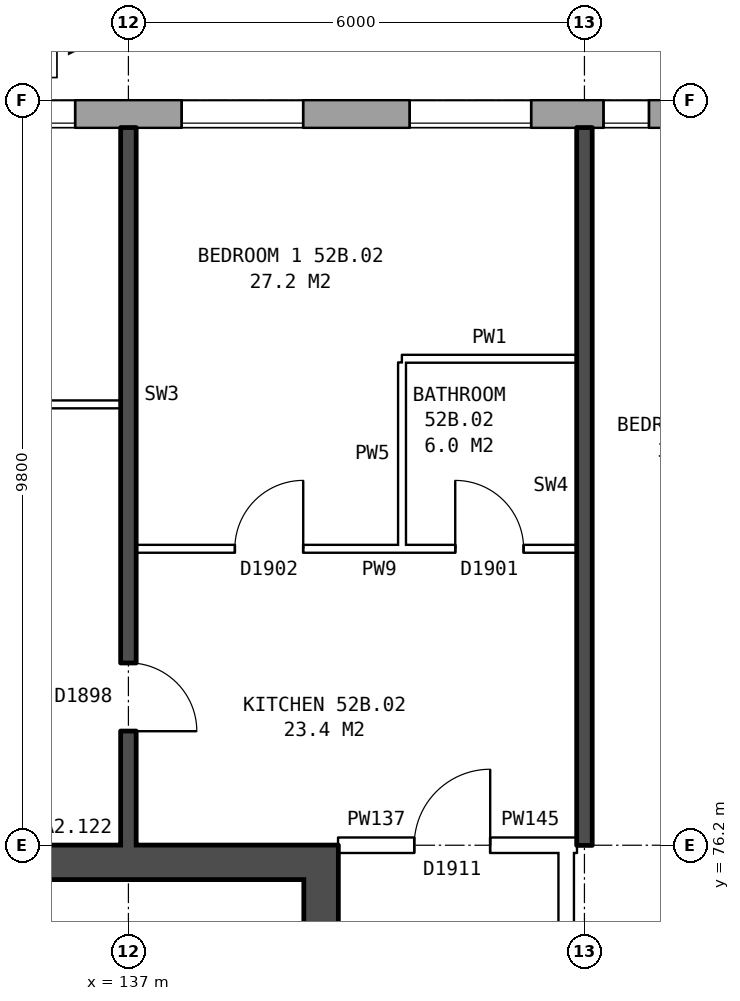
"""IFC4 building model, lengths in metres.
Left out: names, types, materials, properties, quantities, classifications, styles, units other than length and angle.
Written with IfcOpenShell. Run it as: python <this file> out.ifc"""

import sys

from ifc_helpers import new_model, si_unit, direction, frame, frame_2d, origin, place, context, subcontext, project, spatial, rectangle, extrude, element, fill, save


model = new_model("IFC4")
c1 = context("Model", 3, precision=1e-05, world=origin(), true_north=direction((0.0, 1.0)))
c2 = subcontext(c1, "Body", "Model", "MODEL_VIEW")
j1 = project(units=[si_unit("LENGTHUNIT", "METRE"), si_unit("PLANEANGLEUNIT", "RADIAN")], contexts=[c1])
p1 = place(None, origin())
s1 = spatial("IfcSite", under=j1, at=p1, CompositionType="ELEMENT")
p2 = place(p1, origin())
s2 = spatial("IfcBuilding", under=s1, at=p2, CompositionType="ELEMENT")
p3 = place(p2, frame((0.0, 0.0, 185.1)))
s3 = spatial("IfcBuildingStorey", under=s2, at=p3, CompositionType="ELEMENT", Elevation=185.1)
p4 = place(p3, frame((167.175, 85.82, 0.0), z_axis=(0.0, 0.0, 1.0), x_axis=(-1.0, 0.0, 0.0)))
e1 = element("IfcWall", 1, at=p4, inside=s3, PredefinedType="STANDARD", context=c2, shape_type="SweptSolid", body=[
    extrude(rectangle(XDim=33.101, YDim=0.36, at=frame_2d((16.55, 0.0))), origin(), (0.0, 0.0, 1.0), 2.85),
])
p5 = place(p4, frame((0.875, 0.0, 0.8)))
e2 = element("IfcOpeningElement", 2, at=p5, cuts=e1, PredefinedType="OPENING", context=c2, shape_type="SweptSolid", body=[
    extrude(rectangle(XDim=1.6, YDim=1.8, at=frame_2d((0.8, 0.9))), frame((0.0, 0.19, 0.0), z_axis=(0.0, -1.0, 0.0), x_axis=(1.0, 0.0, 0.0)), (0.0, 0.0, 1.0), 0.38),
])
p6 = place(p4, frame((3.875, 0.0, 0.8)))
e3 = element("IfcOpeningElement", 3, at=p6, cuts=e1, PredefinedType="OPENING", context=c2, shape_type="SweptSolid", body=[
    extrude(rectangle(XDim=1.6, YDim=1.8, at=frame_2d((0.8, 0.9))), frame((0.0, 0.19, 0.0), z_axis=(0.0, -1.0, 0.0), x_axis=(1.0, 0.0, 0.0)), (0.0, 0.0, 1.0), 0.38),
])
p7 = place(p4, frame((6.875, 0.0, 0.8)))
e4 = element("IfcOpeningElement", 4, at=p7, cuts=e1, PredefinedType="OPENING", context=c2, shape_type="SweptSolid", body=[
    extrude(rectangle(XDim=1.6, YDim=1.8, at=frame_2d((0.8, 0.9))), frame((0.0, 0.19, 0.0), z_axis=(0.0, -1.0, 0.0), x_axis=(1.0, 0.0, 0.0)), (0.0, 0.0, 1.0), 0.38),
])
p8 = place(p4, frame((8.775, 0.0, 1.4)))
e5 = element("IfcOpeningElement", 5, at=p8, cuts=e1, PredefinedType="OPENING", context=c2, shape_type="SweptSolid", body=[
    extrude(rectangle(XDim=0.8, YDim=1.2, at=frame_2d((0.4, 0.6))), frame((0.0, 0.19, 0.0), z_axis=(0.0, -1.0, 0.0), x_axis=(1.0, 0.0, 0.0)), (0.0, 0.0, 1.0), 0.38),
])
p9 = place(p4, frame((12.875, 0.0, 0.8)))
e6 = element("IfcOpeningElement", 6, at=p9, cuts=e1, PredefinedType="OPENING", context=c2, shape_type="SweptSolid", body=[
    extrude(rectangle(XDim=1.6, YDim=1.8, at=frame_2d((0.8, 0.9))), frame((0.0, 0.19, 0.0), z_axis=(0.0, -1.0, 0.0), x_axis=(1.0, 0.0, 0.0)), (0.0, 0.0, 1.0), 0.38),
])
p10 = place(p4, frame((15.875, 0.0, 0.8)))
e7 = element("IfcOpeningElement", 7, at=p10, cuts=e1, PredefinedType="OPENING", context=c2, shape_type="SweptSolid", body=[
    extrude(rectangle(XDim=1.6, YDim=1.8, at=frame_2d((0.8, 0.9))), frame((0.0, 0.19, 0.0), z_axis=(0.0, -1.0, 0.0), x_axis=(1.0, 0.0, 0.0)), (0.0, 0.0, 1.0), 0.38),
])
p11 = place(p4, frame((18.875, 0.0, 0.8)))
e8 = element("IfcOpeningElement", 8, at=p11, cuts=e1, PredefinedType="OPENING", context=c2, shape_type="SweptSolid", body=[
    extrude(rectangle(XDim=1.6, YDim=1.8, at=frame_2d((0.8, 0.9))), frame((0.0, 0.19, 0.0), z_axis=(0.0, -1.0, 0.0), x_axis=(1.0, 0.0, 0.0)), (0.0, 0.0, 1.0), 0.38),
])
p12 = place(p4, frame((21.325, 0.0, 0.25)))
e9 = element("IfcOpeningElement", 9, at=p12, cuts=e1, PredefinedType="OPENING", context=c2, shape_type="SweptSolid", body=[
    extrude(rectangle(XDim=0.6, YDim=1.8, at=frame_2d((0.3, 0.9))), frame((0.0, 0.19, 0.0), z_axis=(0.0, -1.0, 0.0), x_axis=(1.0, 0.0, 0.0)), (0.0, 0.0, 1.0), 0.38),
])
p13 = place(p4, frame((24.875, 0.0, 0.8)))
e10 = element("IfcOpeningElement", 10, at=p13, cuts=e1, PredefinedType="OPENING", context=c2, shape_type="SweptSolid", body=[
    extrude(rectangle(XDim=1.6, YDim=1.8, at=frame_2d((0.8, 0.9))), frame((0.0, 0.19, 0.0), z_axis=(0.0, -1.0, 0.0), x_axis=(1.0, 0.0, 0.0)), (0.0, 0.0, 1.0), 0.38),
])
p14 = place(p4, frame((27.875, 0.0, 0.8)))
e11 = element("IfcOpeningElement", 11, at=p14, cuts=e1, PredefinedType="OPENING", context=c2, shape_type="SweptSolid", body=[
    extrude(rectangle(XDim=1.6, YDim=1.8, at=frame_2d((0.8, 0.9))), frame((0.0, 0.19, 0.0), z_axis=(0.0, -1.0, 0.0), x_axis=(1.0, 0.0, 0.0)), (0.0, 0.0, 1.0), 0.38),
])
p15 = place(p4, frame((30.875, 0.0, 0.8)))
e12 = element("IfcOpeningElement", 12, at=p15, cuts=e1, PredefinedType="OPENING", context=c2, shape_type="SweptSolid", body=[
    extrude(rectangle(XDim=1.6, YDim=1.8, at=frame_2d((0.8, 0.9))), frame((0.0, 0.19, 0.0), z_axis=(0.0, -1.0, 0.0), x_axis=(1.0, 0.0, 0.0)), (0.0, 0.0, 1.0), 0.38),
])
p16 = place(p4, frame((11.125, 0.0, 0.8)))
e13 = element("IfcOpeningElement", 13, at=p16, cuts=e1, PredefinedType="OPENING", context=c2, shape_type="SweptSolid", body=[
    extrude(rectangle(XDim=0.8, YDim=1.2, at=frame_2d((0.4, 0.6))), frame((0.0, 0.19, 0.0), z_axis=(0.0, -1.0, 0.0), x_axis=(1.0, 0.0, 0.0)), (0.0, 0.0, 1.0), 0.38),
])
p17 = place(p4, frame((22.225, 0.0, 0.15)))
e14 = element("IfcOpeningElement", 14, at=p17, cuts=e1, PredefinedType="OPENING", context=c2, shape_type="SweptSolid", body=[
    extrude(rectangle(XDim=0.6, YDim=0.9, at=frame_2d((0.3, 0.45))), frame((0.0, 0.19, 0.0), z_axis=(0.0, -1.0, 0.0), x_axis=(1.0, 0.0, 0.0)), (0.0, 0.0, 1.0), 0.38),
])
p18 = place(p4, frame((23.325, 0.0, 1.65)))
e15 = element("IfcOpeningElement", 15, at=p18, cuts=e1, PredefinedType="OPENING", context=c2, shape_type="SweptSolid", body=[
    extrude(rectangle(XDim=0.6, YDim=0.9, at=frame_2d((0.3, 0.45))), frame((0.0, 0.19, 0.0), z_axis=(0.0, -1.0, 0.0), x_axis=(1.0, 0.0, 0.0)), (0.0, 0.0, 1.0), 0.38),
])
p19 = place(p3, frame((139.535, 63.8, 0.0), z_axis=(0.0, 0.0, 1.0), x_axis=(0.0, 1.0, 0.0)))
e16 = element("IfcWall", 16, at=p19, inside=s3, PredefinedType="SHEAR", context=c2, shape_type="SweptSolid", body=[
    extrude(rectangle(XDim=12.4, YDim=0.45, at=frame_2d((6.2, 0.0))), origin(), (0.0, 0.0, 1.0), 2.85),
])
p20 = place(p19, frame((1.325, 0.0, 0.0)))
e17 = element("IfcOpeningElement", 17, at=p20, cuts=e16, PredefinedType="OPENING", context=c2, shape_type="SweptSolid", body=[
    extrude(rectangle(XDim=1.1, YDim=2.1, at=frame_2d((0.55, 1.05))), frame((0.0, 0.235, 0.0), z_axis=(0.0, -1.0, 0.0), x_axis=(1.0, 0.0, 0.0)), (0.0, 0.0, 1.0), 0.47),
])
p21 = place(p19, frame((3.6, 0.0, 0.0)))
e18 = element("IfcOpeningElement", 18, at=p21, cuts=e16, PredefinedType="OPENING", context=c2, shape_type="SweptSolid", body=[
    extrude(rectangle(XDim=1.1, YDim=2.1, at=frame_2d((0.55, 1.05))), frame((0.0, 0.235, 0.0), z_axis=(0.0, -1.0, 0.0), x_axis=(1.0, 0.0, 0.0)), (0.0, 0.0, 1.0), 0.47),
])
p22 = place(p19, frame((5.8, 0.0, 0.0)))
e19 = element("IfcOpeningElement", 19, at=p22, cuts=e16, PredefinedType="OPENING", context=c2, shape_type="SweptSolid", body=[
    extrude(rectangle(XDim=1.1, YDim=2.1, at=frame_2d((0.55, 1.05))), frame((0.0, 0.235, 0.0), z_axis=(0.0, -1.0, 0.0), x_axis=(1.0, 0.0, 0.0)), (0.0, 0.0, 1.0), 0.47),
])
p23 = place(p19, frame((9.9, 0.0, 0.0)))
e20 = element("IfcOpeningElement", 20, at=p23, cuts=e16, PredefinedType="OPENING", context=c2, shape_type="SweptSolid", body=[
    extrude(rectangle(XDim=1.1, YDim=2.1, at=frame_2d((0.55, 1.05))), frame((0.0, 0.235, 0.0), z_axis=(0.0, -1.0, 0.0), x_axis=(1.0, 0.0, 0.0)), (0.0, 0.0, 1.0), 0.47),
])
p24 = place(p19, frame((8.125, 0.0, 0.0)))
e21 = element("IfcOpeningElement", 21, at=p24, cuts=e16, PredefinedType="OPENING", context=c2, shape_type="SweptSolid", body=[
    extrude(rectangle(XDim=0.85, YDim=2.1, at=frame_2d((0.425, 1.05))), frame((0.0, 0.235, 0.0), z_axis=(0.0, -1.0, 0.0), x_axis=(1.0, 0.0, 0.0)), (0.0, 0.0, 1.0), 0.47),
])
p25 = place(p3, frame((139.31, 75.975, 0.0), z_axis=(0.0, 0.0, 1.0), x_axis=(-1.0, 0.0, 0.0)))
e22 = element("IfcWall", 22, at=p25, inside=s3, PredefinedType="SHEAR", context=c2, shape_type="SweptSolid", body=[
    extrude(rectangle(XDim=7.5, YDim=0.45, at=frame_2d((3.75, 0.0))), origin(), (0.0, 0.0, 1.0), 2.85),
])
p26 = place(p3, frame((142.76, 63.9, 0.0), z_axis=(0.0, 0.0, 1.0), x_axis=(0.0, 1.0, 0.0)))
e23 = element("IfcWall", 23, at=p26, inside=s3, PredefinedType="PARTITIONING", context=c2, shape_type="SweptSolid", body=[
    extrude(rectangle(XDim=12.2, YDim=0.2, at=frame_2d((6.1, 0.0))), origin(), (0.0, 0.0, 1.0), 2.85),
])
p27 = place(p26, frame((5.1, 0.0, 0.0)))
e24 = element("IfcOpeningElement", 24, at=p27, cuts=e23, PredefinedType="OPENING", context=c2, shape_type="SweptSolid", body=[
    extrude(rectangle(XDim=2.0, YDim=2.1, at=frame_2d((1.0, 1.05))), frame((0.0, 0.11, 0.0), z_axis=(0.0, -1.0, 0.0), x_axis=(1.0, 0.0, 0.0)), (0.0, 0.0, 1.0), 0.22),
])
p28 = place(p3, frame((139.76, 76.2, 0.0), z_axis=(0.0, 0.0, 1.0), x_axis=(1.0, 0.0, 0.0)))
e25 = element("IfcWall", 25, at=p28, inside=s3, PredefinedType="PARTITIONING", context=c2, shape_type="SweptSolid", body=[
    extrude(rectangle(XDim=3.0, YDim=0.2, at=frame_2d((1.5, 0.0))), origin(), (0.0, 0.0, 1.0), 2.85),
])
p29 = place(p28, frame((1.0, 0.0, 0.0)))
e26 = element("IfcOpeningElement", 26, at=p29, cuts=e25, PredefinedType="OPENING", context=c2, shape_type="SweptSolid", body=[
    extrude(rectangle(XDim=1.0, YDim=2.1, at=frame_2d((0.5, 1.05))), frame((0.0, 0.11, 0.0), z_axis=(0.0, -1.0, 0.0), x_axis=(1.0, 0.0, 0.0)), (0.0, 0.0, 1.0), 0.22),
])
p30 = place(p3, frame((142.76, 76.2, 0.0), z_axis=(0.0, 0.0, 1.0), x_axis=(1.0, 0.0, 0.0)))
e27 = element("IfcWall", 27, at=p30, inside=s3, PredefinedType="PARTITIONING", context=c2, shape_type="SweptSolid", body=[
    extrude(rectangle(XDim=0.14, YDim=0.2, at=frame_2d((0.07, 0.0))), origin(), (0.0, 0.0, 1.0), 2.85),
])
p31 = place(p3, frame((137.1, 80.1, 0.0), z_axis=(0.0, 0.0, 1.0), x_axis=(1.0, 0.0, 0.0)))
e28 = element("IfcWall", 28, at=p31, inside=s3, PredefinedType="PARTITIONING", context=c2, shape_type="SweptSolid", body=[
    extrude(rectangle(XDim=5.8, YDim=0.1, at=frame_2d((2.9, 0.0))), origin(), (0.0, 0.0, 1.0), 2.85),
])
p32 = place(p31, frame((1.3, 0.0, 0.0)))
e29 = element("IfcOpeningElement", 29, at=p32, cuts=e28, PredefinedType="OPENING", context=c2, shape_type="SweptSolid", body=[
    extrude(rectangle(XDim=0.9, YDim=2.1, at=frame_2d((0.45, 1.05))), frame((0.0, 0.06, 0.0), z_axis=(0.0, -1.0, 0.0), x_axis=(1.0, 0.0, 0.0)), (0.0, 0.0, 1.0), 0.12),
])
p33 = place(p31, frame((4.2, 0.0, 0.0)))
e30 = element("IfcOpeningElement", 30, at=p33, cuts=e28, PredefinedType="OPENING", context=c2, shape_type="SweptSolid", body=[
    extrude(rectangle(XDim=0.9, YDim=2.1, at=frame_2d((0.45, 1.05))), frame((0.0, 0.06, 0.0), z_axis=(0.0, -1.0, 0.0), x_axis=(1.0, 0.0, 0.0)), (0.0, 0.0, 1.0), 0.12),
])
p34 = place(p3, frame((131.36, 82.0, 0.0), z_axis=(0.0, 0.0, 1.0), x_axis=(1.0, 0.0, 0.0)))
e31 = element("IfcWall", 31, at=p34, inside=s3, PredefinedType="PARTITIONING", context=c2, shape_type="SweptSolid", body=[
    extrude(rectangle(XDim=5.54, YDim=0.1, at=frame_2d((2.77, 0.0))), origin(), (0.0, 0.0, 1.0), 2.85),
])
p35 = place(p34, frame((2.32, 0.0, 0.0)))
e32 = element("IfcOpeningElement", 32, at=p35, cuts=e31, PredefinedType="OPENING", context=c2, shape_type="SweptSolid", body=[
    extrude(rectangle(XDim=0.9, YDim=2.1, at=frame_2d((0.45, 1.05))), frame((0.0, 0.06, 0.0), z_axis=(0.0, -1.0, 0.0), x_axis=(1.0, 0.0, 0.0)), (0.0, 0.0, 1.0), 0.12),
])
p36 = place(p3, frame((140.6, 82.6, 0.0), z_axis=(0.0, 0.0, 1.0), x_axis=(1.0, 0.0, 0.0)))
e33 = element("IfcWall", 33, at=p36, inside=s3, PredefinedType="PARTITIONING", context=c2, shape_type="SweptSolid", body=[
    extrude(rectangle(XDim=2.3, YDim=0.1, at=frame_2d((1.15, 0.0))), origin(), (0.0, 0.0, 1.0), 2.85),
])
p37 = place(p3, frame((137.0, 76.2, 0.0), z_axis=(0.0, 0.0, 1.0), x_axis=(0.0, 1.0, 0.0)))
e34 = element("IfcWall", 34, at=p37, inside=s3, PredefinedType="SOLIDWALL", context=c2, shape_type="SweptSolid", body=[
    extrude(rectangle(XDim=9.44, YDim=0.2, at=frame_2d((4.72, 0.0))), origin(), (0.0, 0.0, 1.0), 2.85),
])
p38 = place(p37, frame((1.5, 0.0, 0.0)))
e35 = element("IfcOpeningElement", 35, at=p38, cuts=e34, PredefinedType="OPENING", context=c2, shape_type="SweptSolid", body=[
    extrude(rectangle(XDim=0.9, YDim=2.1, at=frame_2d((0.45, 1.05))), frame((0.0, 0.11, 0.0), z_axis=(0.0, -1.0, 0.0), x_axis=(1.0, 0.0, 0.0)), (0.0, 0.0, 1.0), 0.22),
])
p39 = place(p3, frame((140.6, 80.15, 0.0), z_axis=(0.0, 0.0, 1.0), x_axis=(0.0, 1.0, 0.0)))
e36 = element("IfcWall", 36, at=p39, inside=s3, PredefinedType="PARTITIONING", context=c2, shape_type="SweptSolid", body=[
    extrude(rectangle(XDim=2.4, YDim=0.1, at=frame_2d((1.2, 0.0))), origin(), (0.0, 0.0, 1.0), 2.85),
])
p40 = place(p3, frame((143.0, 76.2, 0.0), z_axis=(0.0, 0.0, 1.0), x_axis=(0.0, 1.0, 0.0)))
e37 = element("IfcWall", 37, at=p40, inside=s3, PredefinedType="SOLIDWALL", context=c2, shape_type="SweptSolid", body=[
    extrude(rectangle(XDim=9.44, YDim=0.2, at=frame_2d((4.72, 0.0))), origin(), (0.0, 0.0, 1.0), 2.85),
])
p41 = place(p13, origin())
e38 = element("IfcWindow", 38, at=p41, inside=s3, PartitioningType="SINGLE_PANEL", PredefinedType="WINDOW", context=c2, shape_type="SweptSolid", body=[
    extrude(rectangle(XDim=1.6, YDim=1.8, at=frame_2d((0.8, 0.9))), frame((0.0, 0.15, 0.0), z_axis=(0.0, -1.0, 0.0), x_axis=(1.0, 0.0, 0.0)), (0.0, 0.0, 1.0), 0.06),
])
fill(e10, e38)
p42 = place(p14, origin())
e39 = element("IfcWindow", 39, at=p42, inside=s3, PartitioningType="SINGLE_PANEL", PredefinedType="WINDOW", context=c2, shape_type="SweptSolid", body=[
    extrude(rectangle(XDim=1.6, YDim=1.8, at=frame_2d((0.8, 0.9))), frame((0.0, 0.15, 0.0), z_axis=(0.0, -1.0, 0.0), x_axis=(1.0, 0.0, 0.0)), (0.0, 0.0, 1.0), 0.06),
])
fill(e11, e39)
p43 = place(p15, origin())
e40 = element("IfcWindow", 40, at=p43, inside=s3, PartitioningType="SINGLE_PANEL", PredefinedType="WINDOW", context=c2, shape_type="SweptSolid", body=[
    extrude(rectangle(XDim=1.6, YDim=1.8, at=frame_2d((0.8, 0.9))), frame((0.0, 0.15, 0.0), z_axis=(0.0, -1.0, 0.0), x_axis=(1.0, 0.0, 0.0)), (0.0, 0.0, 1.0), 0.06),
])
fill(e12, e40)
p44 = place(p32, origin())
e41 = element("IfcDoor", 41, at=p44, inside=s3, OperationType="SINGLE_SWING_RIGHT", PredefinedType="DOOR", context=c2, shape_type="SweptSolid", body=[
    extrude(rectangle(XDim=0.9, YDim=2.1, at=frame_2d((0.45, 1.05))), frame((0.0, 0.025, 0.0), z_axis=(0.0, -1.0, 0.0), x_axis=(1.0, 0.0, 0.0)), (0.0, 0.0, 1.0), 0.05),
])
fill(e29, e41)
p45 = place(p29, origin())
e42 = element("IfcDoor", 42, at=p45, inside=s3, OperationType="SINGLE_SWING_RIGHT", PredefinedType="DOOR", context=c2, shape_type="SweptSolid", body=[
    extrude(rectangle(XDim=1.0, YDim=2.1, at=frame_2d((0.5, 1.05))), frame((0.0, 0.025, 0.0), z_axis=(0.0, -1.0, 0.0), x_axis=(1.0, 0.0, 0.0)), (0.0, 0.0, 1.0), 0.05),
])
fill(e26, e42)
p46 = place(p38, frame((0.9, 0.0, 0.0), z_axis=(0.0, 0.0, 1.0), x_axis=(-1.0, 0.0, 0.0)))
e43 = element("IfcDoor", 43, at=p46, inside=s3, OperationType="SINGLE_SWING_RIGHT", PredefinedType="DOOR", context=c2, shape_type="SweptSolid", body=[
    extrude(rectangle(XDim=0.9, YDim=2.1, at=frame_2d((0.45, 1.05))), frame((0.0, 0.025, 0.0), z_axis=(0.0, -1.0, 0.0), x_axis=(1.0, 0.0, 0.0)), (0.0, 0.0, 1.0), 0.05),
])
fill(e35, e43)
p47 = place(p33, origin())
e44 = element("IfcDoor", 44, at=p47, inside=s3, OperationType="SINGLE_SWING_LEFT", PredefinedType="DOOR", context=c2, shape_type="SweptSolid", body=[
    extrude(rectangle(XDim=0.9, YDim=2.1, at=frame_2d((0.45, 1.05))), frame((0.0, 0.025, 0.0), z_axis=(0.0, -1.0, 0.0), x_axis=(1.0, 0.0, 0.0)), (0.0, 0.0, 1.0), 0.05),
])
fill(e30, e44)
p48 = place(p18, origin())
e45 = element("IfcWindow", 45, at=p48, inside=s3, PartitioningType="SINGLE_PANEL", PredefinedType="WINDOW", context=c2, shape_type="SweptSolid", body=[
    extrude(rectangle(XDim=0.6, YDim=0.9, at=frame_2d((0.3, 0.45))), frame((0.0, 0.15, 0.0), z_axis=(0.0, -1.0, 0.0), x_axis=(1.0, 0.0, 0.0)), (0.0, 0.0, 1.0), 0.06),
])
fill(e15, e45)
save(model, sys.argv[1])
